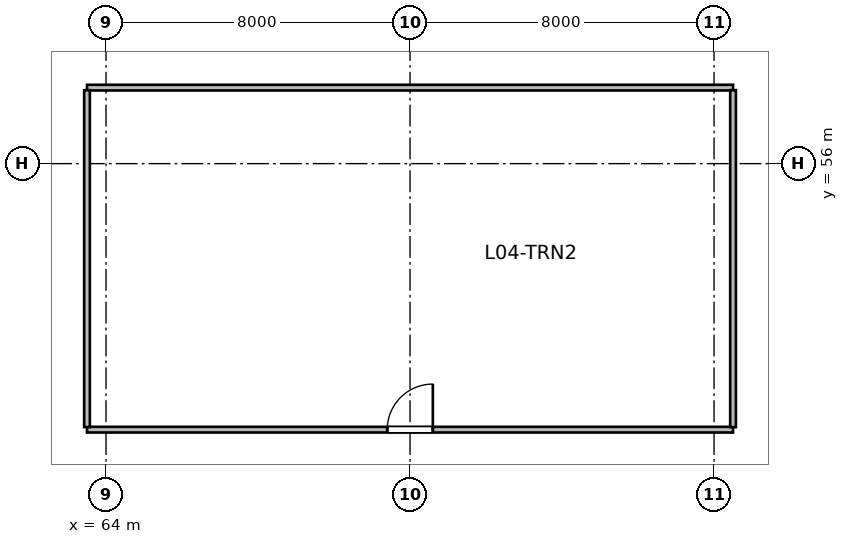
"""IFC4 building model, lengths in metres.
Left out: names, types, materials, properties, quantities, classifications, styles, units other than length and angle.
Written with IfcOpenShell. Run it as: python <this file> out.ifc"""

import sys

from ifc_helpers import new_model, si_unit, direction, frame, frame_2d, origin, place, context, subcontext, project, spatial, rectangle, extrude, source, transform, mapped, element, fill, save


model = new_model("IFC4")
c1 = context("Model", 3, precision=1e-05, world=origin(), true_north=direction((0.0, 1.0)))
c2 = subcontext(c1, "Body", "Model", "MODEL_VIEW")
j1 = project(units=[si_unit("LENGTHUNIT", "METRE"), si_unit("PLANEANGLEUNIT", "RADIAN")], contexts=[c1])
p1 = place(None, origin())
s1 = spatial("IfcSite", under=j1, at=p1, CompositionType="ELEMENT")
p2 = place(p1, origin())
s2 = spatial("IfcBuilding", under=s1, at=p2, CompositionType="ELEMENT")
p3 = place(p2, frame((0.0, 0.0, 24.0)))
s3 = spatial("IfcBuildingStorey", under=s2, at=p3, CompositionType="ELEMENT", Elevation=24.0)
m1 = source(origin(), c2, "Body", "SweptSolid", [
    extrude(rectangle(XDim=17.0, YDim=0.15, at=frame_2d((8.5, 0.0))), origin(), (0.0, 0.0, 1.0), 5.55),
])
p4 = place(p3, frame((63.5, 49.0, 0.0), z_axis=(0.0, 0.0, 1.0), x_axis=(1.0, 0.0, 0.0)))
e1 = element("IfcWall", 1, at=p4, inside=s3, PredefinedType="PARTITIONING", context=c2, shape_type="MappedRepresentation", body=[
    mapped(m1, transform((0.0, 0.0, 0.0), scale=1.0)),
])
p5 = place(p4, frame((7.9, 0.0, 0.0)))
e2 = element("IfcOpeningElement", 2, at=p5, cuts=e1, PredefinedType="OPENING", context=c2, shape_type="SweptSolid", body=[
    extrude(rectangle(XDim=1.2, YDim=2.15, at=frame_2d((0.6, 1.075))), frame((0.0, 0.085, 0.0), z_axis=(0.0, -1.0, 0.0), x_axis=(1.0, 0.0, 0.0)), (0.0, 0.0, 1.0), 0.17),
])
p6 = place(p3, frame((63.5, 58.0, 0.0), z_axis=(0.0, 0.0, 1.0), x_axis=(1.0, 0.0, 0.0)))
e3 = element("IfcWall", 3, at=p6, inside=s3, PredefinedType="PARTITIONING", context=c2, shape_type="MappedRepresentation", body=[
    mapped(m1, transform((0.0, 0.0, 0.0), scale=1.0)),
])
m2 = source(origin(), c2, "Body", "SweptSolid", [
    extrude(rectangle(XDim=8.865, YDim=0.15, at=frame_2d((4.433, 0.0))), origin(), (0.0, 0.0, 1.0), 2.66),
])
p7 = place(p3, frame((63.5, 49.067, 0.0), z_axis=(0.0, 0.0, 1.0), x_axis=(0.0, 1.0, 0.0)))
e4 = element("IfcWall", 4, at=p7, inside=s3, PredefinedType="PARTITIONING", context=c2, shape_type="MappedRepresentation", body=[
    mapped(m2, transform((0.0, 0.0, 0.0), scale=1.0)),
])
m3 = source(origin(), c2, "Body", "SweptSolid", [
    extrude(rectangle(XDim=8.865, YDim=0.15, at=frame_2d((4.433, 0.0))), origin(), (0.0, 0.0, 1.0), 5.55),
])
p8 = place(p3, frame((80.5, 49.067, 0.0), z_axis=(0.0, 0.0, 1.0), x_axis=(0.0, 1.0, 0.0)))
e5 = element("IfcWall", 5, at=p8, inside=s3, PredefinedType="PARTITIONING", context=c2, shape_type="MappedRepresentation", body=[
    mapped(m3, transform((0.0, 0.0, 0.0), scale=1.0)),
])
m4 = source(origin(), c2, "Body", "SweptSolid", [
    extrude(rectangle(XDim=1.2, YDim=2.15, at=frame_2d((0.6, 1.075))), frame((0.0, 0.025, 0.0), z_axis=(0.0, -1.0, 0.0), x_axis=(1.0, 0.0, 0.0)), (0.0, 0.0, 1.0), 0.05),
])
p9 = place(p5, origin())
e6 = element("IfcDoor", 6, at=p9, inside=s3, OperationType="SINGLE_SWING_RIGHT", PredefinedType="DOOR", context=c2, shape_type="MappedRepresentation", body=[
    mapped(m4, transform((0.0, 0.0, 0.0), scale=1.0)),
])
fill(e2, e6)
save(model, sys.argv[1])
